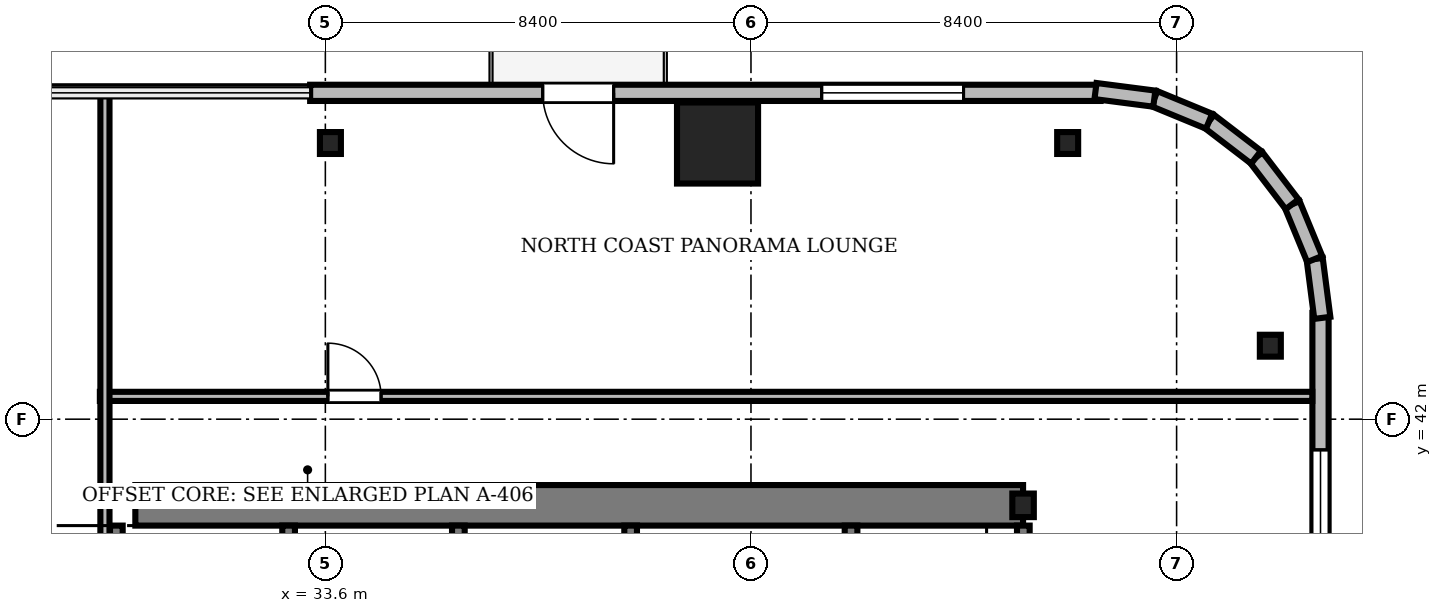
"""IFC4 building model, lengths in metres.
Left out: names, types, materials, properties, quantities, classifications, styles, units other than length and angle.
Written with IfcOpenShell. Run it as: python <this file> out.ifc"""

import sys

from ifc_helpers import new_model, si_unit, direction, frame, frame_2d, origin, origin_2d, place, context, subcontext, project, spatial, rectangle, i_section, extrude, source, transform, mapped, element, fill, save


model = new_model("IFC4")
c1 = context("Model", 3, precision=1e-05, world=origin(), true_north=direction((0.0, 1.0)))
c2 = subcontext(c1, "Body", "Model", "MODEL_VIEW")
j1 = project(units=[si_unit("LENGTHUNIT", "METRE"), si_unit("PLANEANGLEUNIT", "RADIAN")], contexts=[c1])
p1 = place(None, origin())
s1 = spatial("IfcSite", under=j1, at=p1, CompositionType="ELEMENT")
p2 = place(p1, origin())
s2 = spatial("IfcBuilding", under=s1, at=p2, CompositionType="ELEMENT")
p3 = place(p2, frame((0.0, 0.0, 163.1)))
s3 = spatial("IfcBuildingStorey", under=s2, at=p3, CompositionType="ELEMENT", Elevation=163.1)
m1 = source(origin(), c2, "Body", "SweptSolid", [
    extrude(rectangle(XDim=17.52, YDim=0.8, at=frame_2d((8.76, 0.0))), origin(), (0.0, 0.0, 1.0), 3.05),
])
p4 = place(p3, frame((29.85, 40.3, 0.0), z_axis=(0.0, 0.0, 1.0), x_axis=(1.0, 0.0, 0.0)))
e1 = element("IfcWall", 1, at=p4, inside=s3, PredefinedType="SHEAR", context=c2, shape_type="MappedRepresentation", body=[
    mapped(m1, transform((0.0, 0.0, 0.0), scale=1.0)),
])
m2 = source(origin(), c2, "Body", "SweptSolid", [
    extrude(i_section(OverallWidth=0.424, OverallDepth=0.465, WebThickness=0.035, FlangeThickness=0.056, FilletRadius=0.015, at=origin_2d()), origin(), (0.0, 0.0, 1.0), 3.05),
])
p5 = place(p3, frame((47.37, 40.3, 0.0), z_axis=(0.0, 0.0, 1.0), x_axis=(1.0, 0.0, 0.0)))
e2 = element("IfcColumn", 2, at=p5, inside=s3, PredefinedType="COLUMN", context=c2, shape_type="MappedRepresentation", body=[
    mapped(m2, transform((0.0, 0.0, 0.0), scale=1.0)),
])
m3 = source(origin(), c2, "Body", "SweptSolid", [
    extrude(rectangle(XDim=1.6, YDim=1.6, at=origin_2d()), origin(), (0.0, 0.0, 1.0), 3.05),
])
p6 = place(p3, frame((41.34, 47.45, 0.0), z_axis=(0.0, 0.0, 1.0), x_axis=(1.0, 0.0, 0.0)))
e3 = element("IfcColumn", 3, at=p6, inside=s3, PredefinedType="COLUMN", context=c2, shape_type="MappedRepresentation", body=[
    mapped(m3, transform((0.0, 0.0, 0.0), scale=1.0)),
])
m4 = source(origin(), c2, "Body", "SweptSolid", [
    extrude(i_section(OverallWidth=0.414, OverallDepth=0.432, WebThickness=0.026, FlangeThickness=0.04, FilletRadius=0.015, at=origin_2d()), origin(), (0.0, 0.0, 1.0), 3.05),
])
for number, where, z_axis, x_axis in (
    (4, (52.25, 43.45, 0.0), (0.0, 0.0, 1.0), (1.0, 0.0, 0.0)),
    (5, (48.25, 47.45, 0.0), (0.0, 0.0, 1.0), (1.0, 0.0, 0.0)),
    (6, (33.7, 47.45, 0.0), (0.0, 0.0, 1.0), (1.0, 0.0, 0.0)),
):
    element("IfcColumn", number, at=place(p3, frame(where, z_axis=z_axis, x_axis=x_axis)), inside=s3, PredefinedType="COLUMN", context=c2, shape_type="MappedRepresentation", body=[
        mapped(m4, transform((0.0, 0.0, 0.0), scale=1.0)),
    ])
m5 = source(origin(), c2, "Body", "SweptSolid", [
    extrude(rectangle(XDim=15.6, YDim=0.32, at=frame_2d((7.8, 0.0))), origin(), (0.0, 0.0, 1.0), 3.05),
])
p7 = place(p3, frame((48.9, 48.44, 0.0), z_axis=(0.0, 0.0, 1.0), x_axis=(-1.0, 0.0, 0.0)))
e7 = element("IfcWall", 7, at=p7, inside=s3, PredefinedType="SOLIDWALL", context=c2, shape_type="MappedRepresentation", body=[
    mapped(m5, transform((0.0, 0.0, 0.0), scale=1.0)),
])
m6 = source(origin(), c2, "Body", "SweptSolid", [
    extrude(rectangle(XDim=1.4, YDim=2.3, at=frame_2d((0.7, 1.15))), frame((0.0, 0.17, 0.0), z_axis=(0.0, -1.0, 0.0), x_axis=(1.0, 0.0, 0.0)), (0.0, 0.0, 1.0), 0.34),
])
p8 = place(p7, frame((9.61, 0.0, 0.0)))
e8 = element("IfcOpeningElement", 8, at=p8, cuts=e7, PredefinedType="OPENING", context=c2, shape_type="MappedRepresentation", body=[
    mapped(m6, transform((0.0, 0.0, 0.0), scale=1.0)),
])
m7 = source(origin(), c2, "Body", "SweptSolid", [
    extrude(rectangle(XDim=2.8, YDim=2.4, at=frame_2d((1.4, 1.2))), frame((0.0, 0.17, 0.0), z_axis=(0.0, -1.0, 0.0), x_axis=(1.0, 0.0, 0.0)), (0.0, 0.0, 1.0), 0.34),
])
p9 = place(p7, frame((2.705, 0.0, 0.39)))
e9 = element("IfcOpeningElement", 9, at=p9, cuts=e7, PredefinedType="OPENING", context=c2, shape_type="MappedRepresentation", body=[
    mapped(m7, transform((0.0, 0.0, 0.0), scale=1.0)),
])
m8 = source(origin(), c2, "Body", "SweptSolid", [
    extrude(rectangle(XDim=15.6, YDim=0.32, at=frame_2d((7.8, 0.0))), origin(), (0.0, 0.0, 1.0), 3.05),
])
p10 = place(p3, frame((53.24, 28.5, 0.0), z_axis=(0.0, 0.0, 1.0), x_axis=(0.0, 1.0, 0.0)))
e10 = element("IfcWall", 10, at=p10, inside=s3, PredefinedType="SOLIDWALL", context=c2, shape_type="MappedRepresentation", body=[
    mapped(m8, transform((0.0, 0.0, 0.0), scale=1.0)),
])
p11 = place(p10, frame((10.095, 0.0, 0.39)))
e11 = element("IfcOpeningElement", 11, at=p11, cuts=e10, PredefinedType="OPENING", context=c2, shape_type="MappedRepresentation", body=[
    mapped(m7, transform((0.0, 0.0, 0.0), scale=1.0)),
])
m9 = source(origin(), c2, "Body", "SweptSolid", [
    extrude(rectangle(XDim=1.17, YDim=0.32, at=frame_2d((0.585, 0.0))), origin(), (0.0, 0.0, 1.0), 3.05),
])
p12 = place(p3, frame((53.276, 44.0, 0.0), z_axis=(0.0, 0.0, 1.0), x_axis=(-0.128295670475, 0.991735963317, 0.0)))
e12 = element("IfcWall", 12, at=p12, inside=s3, PredefinedType="SOLIDWALL", context=c2, shape_type="MappedRepresentation", body=[
    mapped(m9, transform((0.0, 0.0, 0.0), scale=1.0)),
])
m10 = source(origin(), c2, "Body", "SweptSolid", [
    extrude(rectangle(XDim=1.169, YDim=0.32, at=frame_2d((0.584, 0.0))), origin(), (0.0, 0.0, 1.0), 3.05),
])
p13 = place(p3, frame((53.125, 45.16, 0.0), z_axis=(0.0, 0.0, 1.0), x_axis=(-0.381054331552, 0.924552646638, 0.0)))
e13 = element("IfcWall", 13, at=p13, inside=s3, PredefinedType="SOLIDWALL", context=c2, shape_type="MappedRepresentation", body=[
    mapped(m10, transform((0.0, 0.0, 0.0), scale=1.0)),
])
m11 = source(origin(), c2, "Body", "SweptSolid", [
    extrude(rectangle(XDim=1.169, YDim=0.32, at=frame_2d((0.584, 0.0))), origin(), (0.0, 0.0, 1.0), 3.05),
])
p14 = place(p3, frame((52.68, 46.241, 0.0), z_axis=(0.0, 0.0, 1.0), x_axis=(-0.608387696831, 0.793639975269, 0.0)))
e14 = element("IfcWall", 14, at=p14, inside=s3, PredefinedType="SOLIDWALL", context=c2, shape_type="MappedRepresentation", body=[
    mapped(m11, transform((0.0, 0.0, 0.0), scale=1.0)),
])
m12 = source(origin(), c2, "Body", "SweptSolid", [
    extrude(rectangle(XDim=1.169, YDim=0.32, at=frame_2d((0.584, 0.0))), origin(), (0.0, 0.0, 1.0), 3.05),
])
p15 = place(p3, frame((51.969, 47.169, 0.0), z_axis=(0.0, 0.0, 1.0), x_axis=(-0.793663520347, 0.608356981114, 0.0)))
e15 = element("IfcWall", 15, at=p15, inside=s3, PredefinedType="SOLIDWALL", context=c2, shape_type="MappedRepresentation", body=[
    mapped(m12, transform((0.0, 0.0, 0.0), scale=1.0)),
])
p16 = place(p3, frame((51.041, 47.88, 0.0), z_axis=(0.0, 0.0, 1.0), x_axis=(-0.924552646638, 0.381054331552, 0.0)))
e16 = element("IfcWall", 16, at=p16, inside=s3, PredefinedType="SOLIDWALL", context=c2, shape_type="MappedRepresentation", body=[
    mapped(m10, transform((0.0, 0.0, 0.0), scale=1.0)),
])
p17 = place(p3, frame((49.96, 48.325, 0.0), z_axis=(0.0, 0.0, 1.0), x_axis=(-0.991735963317, 0.128295670475, 0.0)))
e17 = element("IfcWall", 17, at=p17, inside=s3, PredefinedType="SOLIDWALL", context=c2, shape_type="MappedRepresentation", body=[
    mapped(m9, transform((0.0, 0.0, 0.0), scale=1.0)),
])
m13 = source(origin(), c2, "Body", "SweptSolid", [
    extrude(rectangle(XDim=9.25, YDim=0.25, at=frame_2d((4.625, 0.0))), origin(), (0.0, 0.0, 1.0), 3.5),
])
for number, where, z_axis, x_axis in (
    (18, (29.475, 30.65, 0.0), (0.0, 0.0, 1.0), (0.0, 1.0, 0.0)),
    (19, (32.875, 30.65, 0.0), (0.0, 0.0, 1.0), (0.0, 1.0, 0.0)),
    (20, (36.225, 30.65, 0.0), (0.0, 0.0, 1.0), (0.0, 1.0, 0.0)),
    (21, (39.625, 30.65, 0.0), (0.0, 0.0, 1.0), (0.0, 1.0, 0.0)),
    (22, (43.975, 30.65, 0.0), (0.0, 0.0, 1.0), (0.0, 1.0, 0.0)),
    (23, (47.375, 30.65, 0.0), (0.0, 0.0, 1.0), (0.0, 1.0, 0.0)),
):
    element("IfcWall", number, at=place(p3, frame(where, z_axis=z_axis, x_axis=x_axis)), inside=s3, PredefinedType="SOLIDWALL", context=c2, shape_type="MappedRepresentation", body=[
        mapped(m13, transform((0.0, 0.0, 0.0), scale=1.0)),
    ])
m14 = source(origin(), c2, "Body", "SweptSolid", [
    extrude(rectangle(XDim=23.928, YDim=0.18, at=frame_2d((11.964, 0.0))), origin(), (0.0, 0.0, 1.0), 2.326),
])
p18 = place(p3, frame((29.15, 42.45, 0.0), z_axis=(0.0, 0.0, 1.0), x_axis=(1.0, 0.0, 0.0)))
e24 = element("IfcWall", 24, at=p18, inside=s3, PredefinedType="PARTITIONING", context=c2, shape_type="MappedRepresentation", body=[
    mapped(m14, transform((0.0, 0.0, 0.0), scale=1.0)),
])
m15 = source(origin(), c2, "Body", "SweptSolid", [
    extrude(rectangle(XDim=1.05, YDim=2.2, at=frame_2d((0.525, 1.1))), frame((0.0, 0.1, 0.0), z_axis=(0.0, -1.0, 0.0), x_axis=(1.0, 0.0, 0.0)), (0.0, 0.0, 1.0), 0.2),
])
p19 = place(p18, frame((4.5, 0.0, 0.0)))
e25 = element("IfcOpeningElement", 25, at=p19, cuts=e24, PredefinedType="OPENING", context=c2, shape_type="MappedRepresentation", body=[
    mapped(m15, transform((0.0, 0.0, 0.0), scale=1.0)),
])
m16 = source(origin(), c2, "Body", "SweptSolid", [
    extrude(rectangle(XDim=11.45, YDim=0.18, at=frame_2d((5.725, 0.0))), origin(), (0.0, 0.0, 1.0), 2.326),
])
p20 = place(p3, frame((29.25, 37.02, 0.0), z_axis=(0.0, 0.0, 1.0), x_axis=(0.0, 1.0, 0.0)))
e26 = element("IfcWall", 26, at=p20, inside=s3, PredefinedType="PARTITIONING", context=c2, shape_type="MappedRepresentation", body=[
    mapped(m16, transform((0.0, 0.0, 0.0), scale=1.0)),
])
m17 = source(origin(), c2, "Body", "SweptSolid", [
    extrude(rectangle(XDim=1.4, YDim=2.3, at=frame_2d((0.7, 1.15))), frame((0.0, 0.025, 0.0), z_axis=(0.0, -1.0, 0.0), x_axis=(1.0, 0.0, 0.0)), (0.0, 0.0, 1.0), 0.05),
])
p21 = place(p8, frame((1.4, 0.0, 0.0), z_axis=(0.0, 0.0, 1.0), x_axis=(-1.0, 0.0, 0.0)))
e27 = element("IfcDoor", 27, at=p21, inside=s3, OperationType="DOUBLE_DOOR_SLIDING", PredefinedType="DOOR", context=c2, shape_type="MappedRepresentation", body=[
    mapped(m17, transform((0.0, 0.0, 0.0), scale=1.0)),
])
fill(e8, e27)
m18 = source(origin(), c2, "Body", "SweptSolid", [
    extrude(rectangle(XDim=2.8, YDim=2.4, at=frame_2d((1.4, 1.2))), frame((0.0, 0.03, 0.0), z_axis=(0.0, -1.0, 0.0), x_axis=(1.0, 0.0, 0.0)), (0.0, 0.0, 1.0), 0.06),
])
p22 = place(p9, origin())
e28 = element("IfcWindow", 28, at=p22, inside=s3, PartitioningType="SINGLE_PANEL", PredefinedType="WINDOW", context=c2, shape_type="MappedRepresentation", body=[
    mapped(m18, transform((0.0, 0.0, 0.0), scale=1.0)),
])
fill(e9, e28)
p23 = place(p11, origin())
e29 = element("IfcWindow", 29, at=p23, inside=s3, PartitioningType="SINGLE_PANEL", PredefinedType="WINDOW", context=c2, shape_type="MappedRepresentation", body=[
    mapped(m18, transform((0.0, 0.0, 0.0), scale=1.0)),
])
fill(e11, e29)
m19 = source(origin(), c2, "Body", "SweptSolid", [
    extrude(rectangle(XDim=1.05, YDim=2.2, at=frame_2d((0.525, 1.1))), frame((0.0, 0.025, 0.0), z_axis=(0.0, -1.0, 0.0), x_axis=(1.0, 0.0, 0.0)), (0.0, 0.0, 1.0), 0.05),
])
p24 = place(p19, origin())
e30 = element("IfcDoor", 30, at=p24, inside=s3, OperationType="SINGLE_SWING_LEFT", PredefinedType="DOOR", context=c2, shape_type="MappedRepresentation", body=[
    mapped(m19, transform((0.0, 0.0, 0.0), scale=1.0)),
])
fill(e25, e30)
save(model, sys.argv[1])
